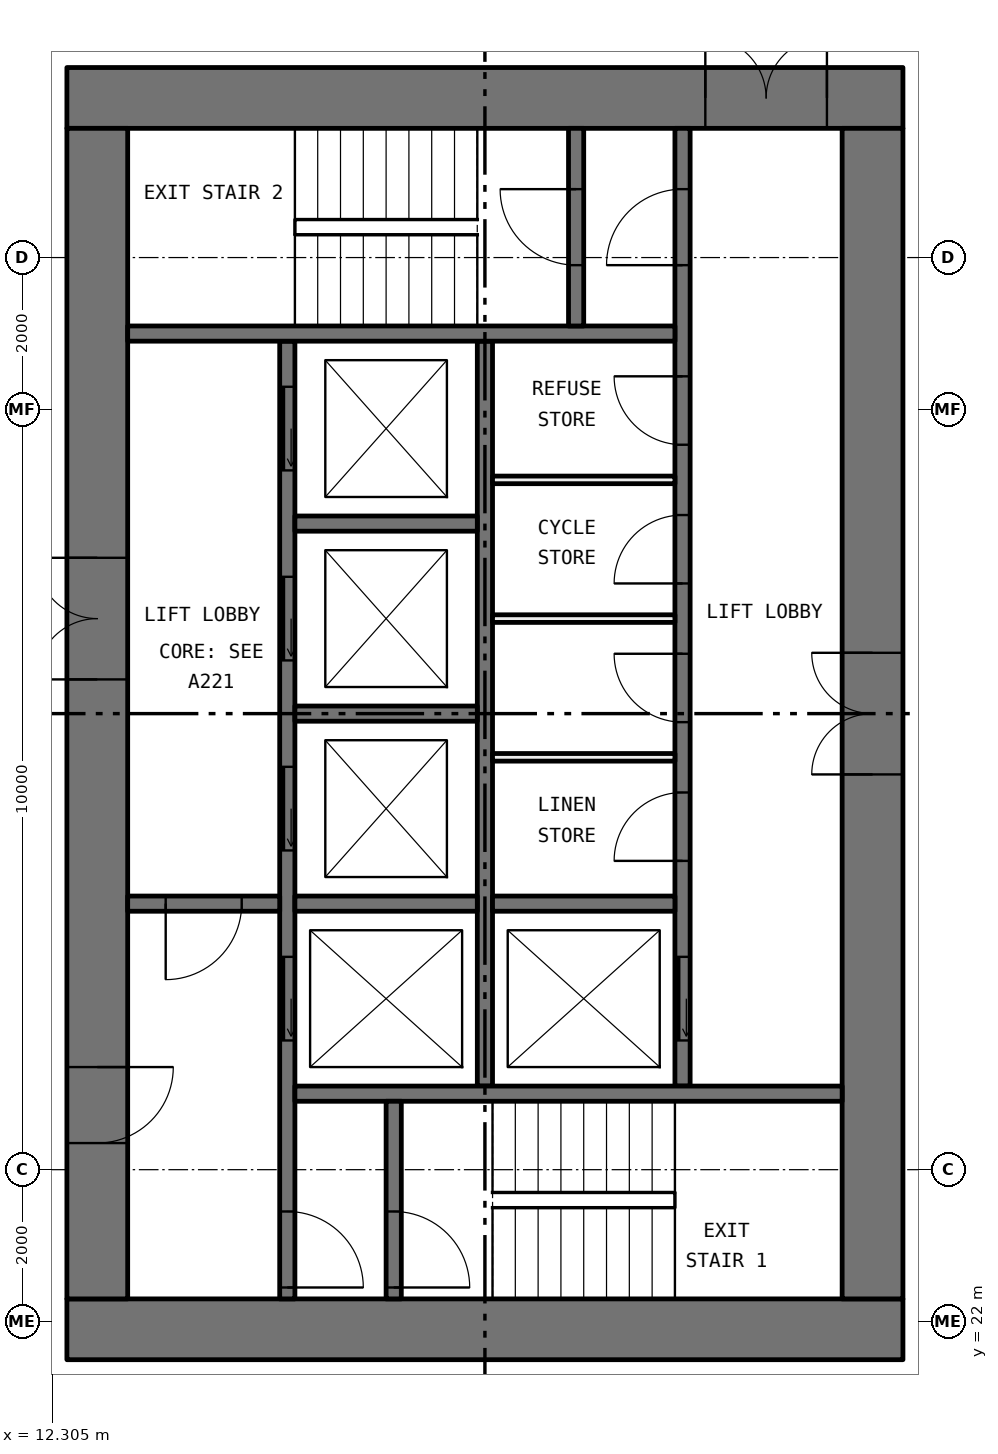
"""IFC4 building model, lengths in metres.
Left out: names, types, materials, properties, quantities, classifications, styles, units other than length and angle.
Written with IfcOpenShell. Run it as: python <this file> out.ifc"""

import sys

from ifc_helpers import new_model, si_unit, direction, frame, frame_2d, origin, place, context, subcontext, project, spatial, rectangle, extrude, element, fill, save


model = new_model("IFC4")
c1 = context("Model", 3, precision=1e-05, world=origin(), true_north=direction((0.0, 1.0)))
c2 = subcontext(c1, "Body", "Model", "MODEL_VIEW")
j1 = project(units=[si_unit("LENGTHUNIT", "METRE"), si_unit("PLANEANGLEUNIT", "RADIAN")], contexts=[c1])
p1 = place(None, origin())
s1 = spatial("IfcSite", under=j1, at=p1, CompositionType="ELEMENT")
p2 = place(p1, origin())
s2 = spatial("IfcBuilding", under=s1, at=p2, CompositionType="ELEMENT")
p3 = place(p2, frame((0.0, 0.0, 81.75)))
s3 = spatial("IfcBuildingStorey", under=s2, at=p3, CompositionType="ELEMENT", Elevation=81.75)
p4 = place(p3, frame((12.5, 21.9, 0.0), z_axis=(0.0, 0.0, 1.0), x_axis=(1.0, 0.0, 0.0)))
e1 = element("IfcWall", 1, at=p4, inside=s3, PredefinedType="SHEAR", context=c2, shape_type="SweptSolid", body=[
    extrude(rectangle(XDim=11.0, YDim=0.8, at=frame_2d((5.5, 0.0))), origin(), (0.0, 0.0, 1.0), 3.05),
])
p5 = place(p3, frame((12.5, 38.1, 0.0), z_axis=(0.0, 0.0, 1.0), x_axis=(1.0, 0.0, 0.0)))
e2 = element("IfcWall", 2, at=p5, inside=s3, PredefinedType="SHEAR", context=c2, shape_type="SweptSolid", body=[
    extrude(rectangle(XDim=11.0, YDim=0.8, at=frame_2d((5.5, 0.0))), origin(), (0.0, 0.0, 1.0), 3.05),
])
p6 = place(p5, frame((8.4, 0.0, 0.0)))
e3 = element("IfcOpeningElement", 3, at=p6, cuts=e2, PredefinedType="OPENING", context=c2, shape_type="SweptSolid", body=[
    extrude(rectangle(XDim=1.6, YDim=2.1, at=frame_2d((0.8, 1.05))), frame((0.0, 0.41, 0.0), z_axis=(0.0, -1.0, 0.0), x_axis=(1.0, 0.0, 0.0)), (0.0, 0.0, 1.0), 0.82),
])
p7 = place(p3, frame((12.9, 22.3, 0.0), z_axis=(0.0, 0.0, 1.0), x_axis=(0.0, 1.0, 0.0)))
e4 = element("IfcWall", 4, at=p7, inside=s3, PredefinedType="SHEAR", context=c2, shape_type="SweptSolid", body=[
    extrude(rectangle(XDim=15.4, YDim=0.8, at=frame_2d((7.7, 0.0))), origin(), (0.0, 0.0, 1.0), 3.05),
])
p8 = place(p7, frame((8.15, 0.0, 0.0)))
e5 = element("IfcOpeningElement", 5, at=p8, cuts=e4, PredefinedType="OPENING", context=c2, shape_type="SweptSolid", body=[
    extrude(rectangle(XDim=1.6, YDim=2.1, at=frame_2d((0.8, 1.05))), frame((0.0, 0.41, 0.0), z_axis=(0.0, -1.0, 0.0), x_axis=(1.0, 0.0, 0.0)), (0.0, 0.0, 1.0), 0.82),
])
p9 = place(p7, frame((2.05, 0.0, 0.0)))
e6 = element("IfcOpeningElement", 6, at=p9, cuts=e4, PredefinedType="OPENING", context=c2, shape_type="SweptSolid", body=[
    extrude(rectangle(XDim=1.0, YDim=2.1, at=frame_2d((0.5, 1.05))), frame((0.0, 0.41, 0.0), z_axis=(0.0, -1.0, 0.0), x_axis=(1.0, 0.0, 0.0)), (0.0, 0.0, 1.0), 0.82),
])
p10 = place(p3, frame((23.1, 22.3, 0.0), z_axis=(0.0, 0.0, 1.0), x_axis=(0.0, 1.0, 0.0)))
e7 = element("IfcWall", 7, at=p10, inside=s3, PredefinedType="SHEAR", context=c2, shape_type="SweptSolid", body=[
    extrude(rectangle(XDim=15.4, YDim=0.8, at=frame_2d((7.7, 0.0))), origin(), (0.0, 0.0, 1.0), 3.05),
])
p11 = place(p10, frame((6.9, 0.0, 0.0)))
e8 = element("IfcOpeningElement", 8, at=p11, cuts=e7, PredefinedType="OPENING", context=c2, shape_type="SweptSolid", body=[
    extrude(rectangle(XDim=1.6, YDim=2.1, at=frame_2d((0.8, 1.05))), frame((0.0, 0.41, 0.0), z_axis=(0.0, -1.0, 0.0), x_axis=(1.0, 0.0, 0.0)), (0.0, 0.0, 1.0), 0.82),
])
p12 = place(p3, frame((15.4, 22.3, 0.0), z_axis=(0.0, 0.0, 1.0), x_axis=(0.0, 1.0, 0.0)))
e9 = element("IfcWall", 9, at=p12, inside=s3, PredefinedType="SOLIDWALL", context=c2, shape_type="SweptSolid", body=[
    extrude(rectangle(XDim=12.6, YDim=0.2, at=frame_2d((6.3, 0.0))), origin(), (0.0, 0.0, 1.0), 3.05),
])
p13 = place(p12, frame((3.4, 0.0, 0.0)))
e10 = element("IfcOpeningElement", 10, at=p13, cuts=e9, PredefinedType="OPENING", context=c2, shape_type="SweptSolid", body=[
    extrude(rectangle(XDim=1.1, YDim=2.1, at=frame_2d((0.55, 1.05))), frame((0.0, 0.11, 0.0), z_axis=(0.0, -1.0, 0.0), x_axis=(1.0, 0.0, 0.0)), (0.0, 0.0, 1.0), 0.22),
])
p14 = place(p12, frame((5.9, 0.0, 0.0)))
e11 = element("IfcOpeningElement", 11, at=p14, cuts=e9, PredefinedType="OPENING", context=c2, shape_type="SweptSolid", body=[
    extrude(rectangle(XDim=1.1, YDim=2.1, at=frame_2d((0.55, 1.05))), frame((0.0, 0.11, 0.0), z_axis=(0.0, -1.0, 0.0), x_axis=(1.0, 0.0, 0.0)), (0.0, 0.0, 1.0), 0.22),
])
p15 = place(p12, frame((8.4, 0.0, 0.0)))
e12 = element("IfcOpeningElement", 12, at=p15, cuts=e9, PredefinedType="OPENING", context=c2, shape_type="SweptSolid", body=[
    extrude(rectangle(XDim=1.1, YDim=2.1, at=frame_2d((0.55, 1.05))), frame((0.0, 0.11, 0.0), z_axis=(0.0, -1.0, 0.0), x_axis=(1.0, 0.0, 0.0)), (0.0, 0.0, 1.0), 0.22),
])
p16 = place(p12, frame((10.9, 0.0, 0.0)))
e13 = element("IfcOpeningElement", 13, at=p16, cuts=e9, PredefinedType="OPENING", context=c2, shape_type="SweptSolid", body=[
    extrude(rectangle(XDim=1.1, YDim=2.1, at=frame_2d((0.55, 1.05))), frame((0.0, 0.11, 0.0), z_axis=(0.0, -1.0, 0.0), x_axis=(1.0, 0.0, 0.0)), (0.0, 0.0, 1.0), 0.22),
])
p17 = place(p12, frame((0.15, 0.0, 0.0)))
e14 = element("IfcOpeningElement", 14, at=p17, cuts=e9, PredefinedType="OPENING", context=c2, shape_type="SweptSolid", body=[
    extrude(rectangle(XDim=1.0, YDim=2.1, at=frame_2d((0.5, 1.05))), frame((0.0, 0.11, 0.0), z_axis=(0.0, -1.0, 0.0), x_axis=(1.0, 0.0, 0.0)), (0.0, 0.0, 1.0), 0.22),
])
p18 = place(p3, frame((20.6, 25.1, 0.0), z_axis=(0.0, 0.0, 1.0), x_axis=(0.0, 1.0, 0.0)))
e15 = element("IfcWall", 15, at=p18, inside=s3, PredefinedType="SOLIDWALL", context=c2, shape_type="SweptSolid", body=[
    extrude(rectangle(XDim=12.6, YDim=0.2, at=frame_2d((6.3, 0.0))), origin(), (0.0, 0.0, 1.0), 3.05),
])
p19 = place(p18, frame((0.6, 0.0, 0.0)))
e16 = element("IfcOpeningElement", 16, at=p19, cuts=e15, PredefinedType="OPENING", context=c2, shape_type="SweptSolid", body=[
    extrude(rectangle(XDim=1.1, YDim=2.1, at=frame_2d((0.55, 1.05))), frame((0.0, 0.11, 0.0), z_axis=(0.0, -1.0, 0.0), x_axis=(1.0, 0.0, 0.0)), (0.0, 0.0, 1.0), 0.22),
])
p20 = place(p18, frame((10.8, 0.0, 0.0)))
e17 = element("IfcOpeningElement", 17, at=p20, cuts=e15, PredefinedType="OPENING", context=c2, shape_type="SweptSolid", body=[
    extrude(rectangle(XDim=1.0, YDim=2.1, at=frame_2d((0.5, 1.05))), frame((0.0, 0.11, 0.0), z_axis=(0.0, -1.0, 0.0), x_axis=(1.0, 0.0, 0.0)), (0.0, 0.0, 1.0), 0.22),
])
p21 = place(p18, frame((2.962, 0.0, 0.0)))
e18 = element("IfcOpeningElement", 18, at=p21, cuts=e15, PredefinedType="OPENING", context=c2, shape_type="SweptSolid", body=[
    extrude(rectangle(XDim=0.9, YDim=2.1, at=frame_2d((0.45, 1.05))), frame((0.0, 0.11, 0.0), z_axis=(0.0, -1.0, 0.0), x_axis=(1.0, 0.0, 0.0)), (0.0, 0.0, 1.0), 0.22),
])
p22 = place(p18, frame((4.788, 0.0, 0.0)))
e19 = element("IfcOpeningElement", 19, at=p22, cuts=e15, PredefinedType="OPENING", context=c2, shape_type="SweptSolid", body=[
    extrude(rectangle(XDim=0.9, YDim=2.1, at=frame_2d((0.45, 1.05))), frame((0.0, 0.11, 0.0), z_axis=(0.0, -1.0, 0.0), x_axis=(1.0, 0.0, 0.0)), (0.0, 0.0, 1.0), 0.22),
])
p23 = place(p18, frame((6.613, 0.0, 0.0)))
e20 = element("IfcOpeningElement", 20, at=p23, cuts=e15, PredefinedType="OPENING", context=c2, shape_type="SweptSolid", body=[
    extrude(rectangle(XDim=0.9, YDim=2.1, at=frame_2d((0.45, 1.05))), frame((0.0, 0.11, 0.0), z_axis=(0.0, -1.0, 0.0), x_axis=(1.0, 0.0, 0.0)), (0.0, 0.0, 1.0), 0.22),
])
p24 = place(p18, frame((8.438, 0.0, 0.0)))
e21 = element("IfcOpeningElement", 21, at=p24, cuts=e15, PredefinedType="OPENING", context=c2, shape_type="SweptSolid", body=[
    extrude(rectangle(XDim=0.9, YDim=2.1, at=frame_2d((0.45, 1.05))), frame((0.0, 0.11, 0.0), z_axis=(0.0, -1.0, 0.0), x_axis=(1.0, 0.0, 0.0)), (0.0, 0.0, 1.0), 0.22),
])
p25 = place(p3, frame((18.0, 25.1, 0.0), z_axis=(0.0, 0.0, 1.0), x_axis=(0.0, 1.0, 0.0)))
e22 = element("IfcWall", 22, at=p25, inside=s3, PredefinedType="SOLIDWALL", context=c2, shape_type="SweptSolid", body=[
    extrude(rectangle(XDim=9.8, YDim=0.2, at=frame_2d((4.9, 0.0))), origin(), (0.0, 0.0, 1.0), 3.05),
])
for number, where, z_axis, x_axis in (
    (23, (15.5, 25.0, 0.0), (0.0, 0.0, 1.0), (1.0, 0.0, 0.0)),
    (24, (13.3, 35.0, 0.0), (0.0, 0.0, 1.0), (1.0, 0.0, 0.0)),
):
    element("IfcWall", number, at=place(p3, frame(where, z_axis=z_axis, x_axis=x_axis)), inside=s3, PredefinedType="SOLIDWALL", context=c2, shape_type="SweptSolid", body=[
        extrude(rectangle(XDim=7.2, YDim=0.2, at=frame_2d((3.6, 0.0))), origin(), (0.0, 0.0, 1.0), 3.05),
    ])
p26 = place(p3, frame((13.3, 27.5, 0.0), z_axis=(0.0, 0.0, 1.0), x_axis=(1.0, 0.0, 0.0)))
e25 = element("IfcWall", 25, at=p26, inside=s3, PredefinedType="SOLIDWALL", context=c2, shape_type="SweptSolid", body=[
    extrude(rectangle(XDim=2.0, YDim=0.2, at=frame_2d((1.0, 0.0))), origin(), (0.0, 0.0, 1.0), 3.05),
])
p27 = place(p26, frame((0.5, 0.0, 0.0)))
e26 = element("IfcOpeningElement", 26, at=p27, cuts=e25, PredefinedType="OPENING", context=c2, shape_type="SweptSolid", body=[
    extrude(rectangle(XDim=1.0, YDim=2.1, at=frame_2d((0.5, 1.05))), frame((0.0, 0.11, 0.0), z_axis=(0.0, -1.0, 0.0), x_axis=(1.0, 0.0, 0.0)), (0.0, 0.0, 1.0), 0.22),
])
p28 = place(p3, frame((16.8, 22.3, 0.0), z_axis=(0.0, 0.0, 1.0), x_axis=(0.0, 1.0, 0.0)))
e27 = element("IfcWall", 27, at=p28, inside=s3, PredefinedType="SOLIDWALL", context=c2, shape_type="SweptSolid", body=[
    extrude(rectangle(XDim=2.6, YDim=0.2, at=frame_2d((1.3, 0.0))), origin(), (0.0, 0.0, 1.0), 3.05),
])
p29 = place(p28, frame((0.15, 0.0, 0.0)))
e28 = element("IfcOpeningElement", 28, at=p29, cuts=e27, PredefinedType="OPENING", context=c2, shape_type="SweptSolid", body=[
    extrude(rectangle(XDim=1.0, YDim=2.1, at=frame_2d((0.5, 1.05))), frame((0.0, 0.11, 0.0), z_axis=(0.0, -1.0, 0.0), x_axis=(1.0, 0.0, 0.0)), (0.0, 0.0, 1.0), 0.22),
])
p30 = place(p3, frame((19.2, 35.1, 0.0), z_axis=(0.0, 0.0, 1.0), x_axis=(0.0, 1.0, 0.0)))
e29 = element("IfcWall", 29, at=p30, inside=s3, PredefinedType="SOLIDWALL", context=c2, shape_type="SweptSolid", body=[
    extrude(rectangle(XDim=2.6, YDim=0.2, at=frame_2d((1.3, 0.0))), origin(), (0.0, 0.0, 1.0), 3.05),
])
p31 = place(p30, frame((0.8, 0.0, 0.0)))
e30 = element("IfcOpeningElement", 30, at=p31, cuts=e29, PredefinedType="OPENING", context=c2, shape_type="SweptSolid", body=[
    extrude(rectangle(XDim=1.0, YDim=2.1, at=frame_2d((0.5, 1.05))), frame((0.0, 0.11, 0.0), z_axis=(0.0, -1.0, 0.0), x_axis=(1.0, 0.0, 0.0)), (0.0, 0.0, 1.0), 0.22),
])
for number, where, z_axis, x_axis in (
    (31, (15.5, 27.5, 0.0), (0.0, 0.0, 1.0), (1.0, 0.0, 0.0)),
    (32, (15.5, 30.0, 0.0), (0.0, 0.0, 1.0), (1.0, 0.0, 0.0)),
    (33, (15.5, 32.5, 0.0), (0.0, 0.0, 1.0), (1.0, 0.0, 0.0)),
    (34, (18.1, 27.5, 0.0), (0.0, 0.0, 1.0), (1.0, 0.0, 0.0)),
):
    element("IfcWall", number, at=place(p3, frame(where, z_axis=z_axis, x_axis=x_axis)), inside=s3, PredefinedType="SOLIDWALL", context=c2, shape_type="SweptSolid", body=[
        extrude(rectangle(XDim=2.4, YDim=0.2, at=frame_2d((1.2, 0.0))), origin(), (0.0, 0.0, 1.0), 3.05),
    ])
for number, where, z_axis, x_axis in (
    (35, (18.1, 29.425, 0.0), (0.0, 0.0, 1.0), (1.0, 0.0, 0.0)),
    (36, (18.1, 31.25, 0.0), (0.0, 0.0, 1.0), (1.0, 0.0, 0.0)),
    (37, (18.1, 33.075, 0.0), (0.0, 0.0, 1.0), (1.0, 0.0, 0.0)),
):
    element("IfcWall", number, at=place(p3, frame(where, z_axis=z_axis, x_axis=x_axis)), inside=s3, PredefinedType="PARTITIONING", context=c2, shape_type="SweptSolid", body=[
        extrude(rectangle(XDim=2.4, YDim=0.1, at=frame_2d((1.2, 0.0))), origin(), (0.0, 0.0, 1.0), 3.05),
    ])
p32 = place(p19, origin())
e38 = element("IfcDoor", 38, at=p32, inside=s3, OperationType="SLIDING_TO_LEFT", PredefinedType="DOOR", context=c2, shape_type="SweptSolid", body=[
    extrude(rectangle(XDim=1.1, YDim=2.1, at=frame_2d((0.55, 1.05))), frame((0.0, 0.025, 0.0), z_axis=(0.0, -1.0, 0.0), x_axis=(1.0, 0.0, 0.0)), (0.0, 0.0, 1.0), 0.05),
])
fill(e16, e38)
p33 = place(p13, origin())
e39 = element("IfcDoor", 39, at=p33, inside=s3, OperationType="SLIDING_TO_LEFT", PredefinedType="DOOR", context=c2, shape_type="SweptSolid", body=[
    extrude(rectangle(XDim=1.1, YDim=2.1, at=frame_2d((0.55, 1.05))), frame((0.0, 0.025, 0.0), z_axis=(0.0, -1.0, 0.0), x_axis=(1.0, 0.0, 0.0)), (0.0, 0.0, 1.0), 0.05),
])
fill(e10, e39)
p34 = place(p14, origin())
e40 = element("IfcDoor", 40, at=p34, inside=s3, OperationType="SLIDING_TO_LEFT", PredefinedType="DOOR", context=c2, shape_type="SweptSolid", body=[
    extrude(rectangle(XDim=1.1, YDim=2.1, at=frame_2d((0.55, 1.05))), frame((0.0, 0.025, 0.0), z_axis=(0.0, -1.0, 0.0), x_axis=(1.0, 0.0, 0.0)), (0.0, 0.0, 1.0), 0.05),
])
fill(e11, e40)
p35 = place(p15, origin())
e41 = element("IfcDoor", 41, at=p35, inside=s3, OperationType="SLIDING_TO_LEFT", PredefinedType="DOOR", context=c2, shape_type="SweptSolid", body=[
    extrude(rectangle(XDim=1.1, YDim=2.1, at=frame_2d((0.55, 1.05))), frame((0.0, 0.025, 0.0), z_axis=(0.0, -1.0, 0.0), x_axis=(1.0, 0.0, 0.0)), (0.0, 0.0, 1.0), 0.05),
])
fill(e12, e41)
p36 = place(p16, origin())
e42 = element("IfcDoor", 42, at=p36, inside=s3, OperationType="SLIDING_TO_LEFT", PredefinedType="DOOR", context=c2, shape_type="SweptSolid", body=[
    extrude(rectangle(XDim=1.1, YDim=2.1, at=frame_2d((0.55, 1.05))), frame((0.0, 0.025, 0.0), z_axis=(0.0, -1.0, 0.0), x_axis=(1.0, 0.0, 0.0)), (0.0, 0.0, 1.0), 0.05),
])
fill(e13, e42)
p37 = place(p29, frame((1.0, 0.0, 0.0), x_axis=(-1.0, 0.0, 0.0)))
e43 = element("IfcDoor", 43, at=p37, inside=s3, OperationType="SINGLE_SWING_LEFT", PredefinedType="DOOR", context=c2, shape_type="SweptSolid", body=[
    extrude(rectangle(XDim=1.0, YDim=2.1, at=frame_2d((0.5, 1.05))), frame((0.0, 0.025, 0.0), z_axis=(0.0, -1.0, 0.0), x_axis=(1.0, 0.0, 0.0)), (0.0, 0.0, 1.0), 0.05),
])
fill(e28, e43)
p38 = place(p17, frame((1.0, 0.0, 0.0), x_axis=(-1.0, 0.0, 0.0)))
e44 = element("IfcDoor", 44, at=p38, inside=s3, OperationType="SINGLE_SWING_LEFT", PredefinedType="DOOR", context=c2, shape_type="SweptSolid", body=[
    extrude(rectangle(XDim=1.0, YDim=2.1, at=frame_2d((0.5, 1.05))), frame((0.0, 0.025, 0.0), z_axis=(0.0, -1.0, 0.0), x_axis=(1.0, 0.0, 0.0)), (0.0, 0.0, 1.0), 0.05),
])
fill(e14, e44)
p39 = place(p20, origin())
e45 = element("IfcDoor", 45, at=p39, inside=s3, OperationType="SINGLE_SWING_RIGHT", PredefinedType="DOOR", context=c2, shape_type="SweptSolid", body=[
    extrude(rectangle(XDim=1.0, YDim=2.1, at=frame_2d((0.5, 1.05))), frame((0.0, 0.025, 0.0), z_axis=(0.0, -1.0, 0.0), x_axis=(1.0, 0.0, 0.0)), (0.0, 0.0, 1.0), 0.05),
])
fill(e17, e45)
p40 = place(p31, origin())
e46 = element("IfcDoor", 46, at=p40, inside=s3, OperationType="SINGLE_SWING_LEFT", PredefinedType="DOOR", context=c2, shape_type="SweptSolid", body=[
    extrude(rectangle(XDim=1.0, YDim=2.1, at=frame_2d((0.5, 1.05))), frame((0.0, 0.025, 0.0), z_axis=(0.0, -1.0, 0.0), x_axis=(1.0, 0.0, 0.0)), (0.0, 0.0, 1.0), 0.05),
])
fill(e30, e46)
p41 = place(p27, frame((1.0, 0.0, 0.0), x_axis=(-1.0, 0.0, 0.0)))
e47 = element("IfcDoor", 47, at=p41, inside=s3, OperationType="SINGLE_SWING_LEFT", PredefinedType="DOOR", context=c2, shape_type="SweptSolid", body=[
    extrude(rectangle(XDim=1.0, YDim=2.1, at=frame_2d((0.5, 1.05))), frame((0.0, 0.025, 0.0), z_axis=(0.0, -1.0, 0.0), x_axis=(1.0, 0.0, 0.0)), (0.0, 0.0, 1.0), 0.05),
])
fill(e26, e47)
p42 = place(p8, origin())
e48 = element("IfcDoor", 48, at=p42, inside=s3, OperationType="DOUBLE_DOOR_SINGLE_SWING", PredefinedType="DOOR", context=c2, shape_type="SweptSolid", body=[
    extrude(rectangle(XDim=1.6, YDim=2.1, at=frame_2d((0.8, 1.05))), frame((0.0, 0.025, 0.0), z_axis=(0.0, -1.0, 0.0), x_axis=(1.0, 0.0, 0.0)), (0.0, 0.0, 1.0), 0.05),
])
fill(e5, e48)
p43 = place(p9, frame((1.0, 0.0, 0.0), x_axis=(-1.0, 0.0, 0.0)))
e49 = element("IfcDoor", 49, at=p43, inside=s3, OperationType="SINGLE_SWING_RIGHT", PredefinedType="DOOR", context=c2, shape_type="SweptSolid", body=[
    extrude(rectangle(XDim=1.0, YDim=2.1, at=frame_2d((0.5, 1.05))), frame((0.0, 0.025, 0.0), z_axis=(0.0, -1.0, 0.0), x_axis=(1.0, 0.0, 0.0)), (0.0, 0.0, 1.0), 0.05),
])
fill(e6, e49)
p44 = place(p6, origin())
e50 = element("IfcDoor", 50, at=p44, inside=s3, OperationType="DOUBLE_DOOR_SINGLE_SWING", PredefinedType="DOOR", context=c2, shape_type="SweptSolid", body=[
    extrude(rectangle(XDim=1.6, YDim=2.1, at=frame_2d((0.8, 1.05))), frame((0.0, 0.025, 0.0), z_axis=(0.0, -1.0, 0.0), x_axis=(1.0, 0.0, 0.0)), (0.0, 0.0, 1.0), 0.05),
])
fill(e3, e50)
p45 = place(p11, origin())
e51 = element("IfcDoor", 51, at=p45, inside=s3, OperationType="DOUBLE_DOOR_SINGLE_SWING", PredefinedType="DOOR", context=c2, shape_type="SweptSolid", body=[
    extrude(rectangle(XDim=1.6, YDim=2.1, at=frame_2d((0.8, 1.05))), frame((0.0, 0.025, 0.0), z_axis=(0.0, -1.0, 0.0), x_axis=(1.0, 0.0, 0.0)), (0.0, 0.0, 1.0), 0.05),
])
fill(e8, e51)
p46 = place(p21, origin())
e52 = element("IfcDoor", 52, at=p46, inside=s3, OperationType="SINGLE_SWING_RIGHT", PredefinedType="DOOR", context=c2, shape_type="SweptSolid", body=[
    extrude(rectangle(XDim=0.9, YDim=2.1, at=frame_2d((0.45, 1.05))), frame((0.0, 0.025, 0.0), z_axis=(0.0, -1.0, 0.0), x_axis=(1.0, 0.0, 0.0)), (0.0, 0.0, 1.0), 0.05),
])
fill(e18, e52)
p47 = place(p22, origin())
e53 = element("IfcDoor", 53, at=p47, inside=s3, OperationType="SINGLE_SWING_LEFT", PredefinedType="DOOR", context=c2, shape_type="SweptSolid", body=[
    extrude(rectangle(XDim=0.9, YDim=2.1, at=frame_2d((0.45, 1.05))), frame((0.0, 0.025, 0.0), z_axis=(0.0, -1.0, 0.0), x_axis=(1.0, 0.0, 0.0)), (0.0, 0.0, 1.0), 0.05),
])
fill(e19, e53)
p48 = place(p23, origin())
e54 = element("IfcDoor", 54, at=p48, inside=s3, OperationType="SINGLE_SWING_RIGHT", PredefinedType="DOOR", context=c2, shape_type="SweptSolid", body=[
    extrude(rectangle(XDim=0.9, YDim=2.1, at=frame_2d((0.45, 1.05))), frame((0.0, 0.025, 0.0), z_axis=(0.0, -1.0, 0.0), x_axis=(1.0, 0.0, 0.0)), (0.0, 0.0, 1.0), 0.05),
])
fill(e20, e54)
p49 = place(p24, origin())
e55 = element("IfcDoor", 55, at=p49, inside=s3, OperationType="SINGLE_SWING_LEFT", PredefinedType="DOOR", context=c2, shape_type="SweptSolid", body=[
    extrude(rectangle(XDim=0.9, YDim=2.1, at=frame_2d((0.45, 1.05))), frame((0.0, 0.025, 0.0), z_axis=(0.0, -1.0, 0.0), x_axis=(1.0, 0.0, 0.0)), (0.0, 0.0, 1.0), 0.05),
])
fill(e21, e55)
save(model, sys.argv[1])
